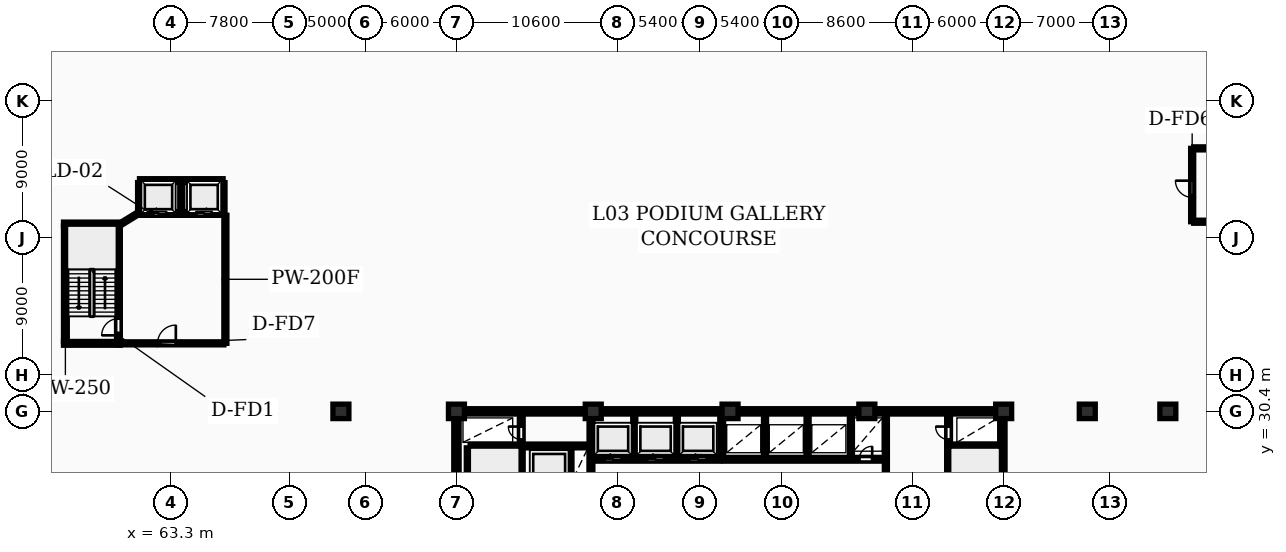
"""IFC4 building model, lengths in metres.
Left out: names, types, materials, properties, quantities, classifications, styles, units other than length and angle.
Written with IfcOpenShell. Run it as: python <this file> out.ifc"""

import sys

from ifc_helpers import new_model, si_unit, direction, frame, frame_2d, origin, origin_2d, place, context, subcontext, project, spatial, rectangle, extrude, element, fill, save


model = new_model("IFC4")
c1 = context("Model", 3, precision=1e-05, world=origin(), true_north=direction((0.0, 1.0)))
c2 = subcontext(c1, "Body", "Model", "MODEL_VIEW")
j1 = project(units=[si_unit("LENGTHUNIT", "METRE"), si_unit("PLANEANGLEUNIT", "RADIAN")], contexts=[c1])
p1 = place(None, origin())
s1 = spatial("IfcSite", under=j1, at=p1, CompositionType="ELEMENT")
p2 = place(p1, origin())
s2 = spatial("IfcBuilding", under=s1, at=p2, CompositionType="ELEMENT")
p3 = place(p2, frame((0.0, 0.0, 14.5)))
s3 = spatial("IfcBuildingStorey", under=s2, at=p3, CompositionType="ELEMENT", Elevation=14.5)
for number, where, z_axis, x_axis in (
    (1, (74.5, 30.4, 0.0), (0.0, 0.0, 1.0), (1.0, 0.0, 0.0)),
    (2, (82.1, 30.4, 0.0), (0.0, 0.0, 1.0), (1.0, 0.0, 0.0)),
    (3, (91.1, 30.4, 0.0), (0.0, 0.0, 1.0), (1.0, 0.0, 0.0)),
    (4, (100.1, 30.4, 0.0), (0.0, 0.0, 1.0), (1.0, 0.0, 0.0)),
    (5, (109.1, 30.4, 0.0), (0.0, 0.0, 1.0), (1.0, 0.0, 0.0)),
    (6, (118.1, 30.4, 0.0), (0.0, 0.0, 1.0), (1.0, 0.0, 0.0)),
    (7, (123.6, 30.4, 0.0), (0.0, 0.0, 1.0), (1.0, 0.0, 0.0)),
    (8, (128.9, 30.4, 0.0), (0.0, 0.0, 1.0), (1.0, 0.0, 0.0)),
):
    element("IfcColumn", number, at=place(p3, frame(where, z_axis=z_axis, x_axis=x_axis)), inside=s3, PredefinedType="COLUMN", context=c2, shape_type="SweptSolid", body=[
        extrude(rectangle(XDim=1.05, YDim=0.95, at=origin_2d()), origin(), (0.0, 0.0, 1.0), 4.5),
    ])
p4 = place(p3, frame((81.925, 30.4, 0.0), z_axis=(0.0, 0.0, 1.0), x_axis=(1.0, 0.0, 0.0)))
e9 = element("IfcWall", 9, at=p4, inside=s3, PredefinedType="SHEAR", context=c2, shape_type="SweptSolid", body=[
    extrude(rectangle(XDim=36.265, YDim=0.35, at=frame_2d((18.132, 0.0))), origin(), (0.0, 0.0, 1.0), 4.5),
])
for number, where, z_axis, x_axis in (
    (10, (82.1, 18.575, 0.0), (0.0, 0.0, 1.0), (0.0, 1.0, 0.0)),
    (11, (118.015, 18.575, 0.0), (0.0, 0.0, 1.0), (0.0, 1.0, 0.0)),
):
    element("IfcWall", number, at=place(p3, frame(where, z_axis=z_axis, x_axis=x_axis)), inside=s3, PredefinedType="SHEAR", context=c2, shape_type="SweptSolid", body=[
        extrude(rectangle(XDim=11.65, YDim=0.35, at=frame_2d((5.825, 0.0))), origin(), (0.0, 0.0, 1.0), 4.5),
    ])
p5 = place(p3, frame((82.875, 20.4, 0.0), z_axis=(0.0, 0.0, 1.0), x_axis=(0.0, 1.0, 0.0)))
e12 = element("IfcWall", 12, at=p5, inside=s3, PredefinedType="SHEAR", context=c2, shape_type="SweptSolid", body=[
    extrude(rectangle(XDim=7.6, YDim=0.25, at=frame_2d((3.8, 0.0))), origin(), (0.0, 0.0, 1.0), 4.5),
])
p6 = place(p3, frame((86.365, 18.6, 0.0), z_axis=(0.0, 0.0, 1.0), x_axis=(0.0, 1.0, 0.0)))
e13 = element("IfcWall", 13, at=p6, inside=s3, PredefinedType="SHEAR", context=c2, shape_type="SweptSolid", body=[
    extrude(rectangle(XDim=11.6, YDim=0.25, at=frame_2d((5.8, 0.0))), origin(), (0.0, 0.0, 1.0), 4.5),
])
p7 = place(p6, frame((0.45, 0.0, 0.0)))
e14 = element("IfcOpeningElement", 14, at=p7, cuts=e13, PredefinedType="OPENING", context=c2, shape_type="SweptSolid", body=[
    extrude(rectangle(XDim=0.85, YDim=2.05, at=frame_2d((0.425, 1.025))), frame((0.0, 0.135, 0.0), z_axis=(0.0, -1.0, 0.0), x_axis=(1.0, 0.0, 0.0)), (0.0, 0.0, 1.0), 0.27),
])
p8 = place(p6, frame((2.05, 0.0, 0.0)))
e15 = element("IfcOpeningElement", 15, at=p8, cuts=e13, PredefinedType="OPENING", context=c2, shape_type="SweptSolid", body=[
    extrude(rectangle(XDim=1.1, YDim=2.1, at=frame_2d((0.55, 1.05))), frame((0.0, 0.135, 0.0), z_axis=(0.0, -1.0, 0.0), x_axis=(1.0, 0.0, 0.0)), (0.0, 0.0, 1.0), 0.27),
])
p9 = place(p6, frame((9.95, 0.0, 0.0)))
e16 = element("IfcOpeningElement", 16, at=p9, cuts=e13, PredefinedType="OPENING", context=c2, shape_type="SweptSolid", body=[
    extrude(rectangle(XDim=0.85, YDim=2.05, at=frame_2d((0.425, 1.025))), frame((0.0, 0.135, 0.0), z_axis=(0.0, -1.0, 0.0), x_axis=(1.0, 0.0, 0.0)), (0.0, 0.0, 1.0), 0.27),
])
p10 = place(p3, frame((83.0, 28.125, 0.0), z_axis=(0.0, 0.0, 1.0), x_axis=(1.0, 0.0, 0.0)))
e17 = element("IfcWall", 17, at=p10, inside=s3, PredefinedType="SHEAR", context=c2, shape_type="SweptSolid", body=[
    extrude(rectangle(XDim=7.82, YDim=0.25, at=frame_2d((3.91, 0.0))), origin(), (0.0, 0.0, 1.0), 4.5),
])
p11 = place(p3, frame((89.6, 25.58, 0.0), z_axis=(0.0, 0.0, 1.0), x_axis=(0.0, 1.0, 0.0)))
e18 = element("IfcWall", 18, at=p11, inside=s3, PredefinedType="PARTITIONING", context=c2, shape_type="SweptSolid", body=[
    extrude(rectangle(XDim=2.42, YDim=0.2, at=frame_2d((1.21, 0.0))), origin(), (0.0, 0.0, 1.0), 4.18),
])
p12 = place(p3, frame((90.95, 18.6, 0.0), z_axis=(0.0, 0.0, 1.0), x_axis=(0.0, 1.0, 0.0)))
e19 = element("IfcWall", 19, at=p12, inside=s3, PredefinedType="SHEAR", context=c2, shape_type="SweptSolid", body=[
    extrude(rectangle(XDim=11.6, YDim=0.25, at=frame_2d((5.8, 0.0))), origin(), (0.0, 0.0, 1.0), 4.5),
])
p13 = place(p12, frame((4.6, 0.0, 0.0)))
e20 = element("IfcOpeningElement", 20, at=p13, cuts=e19, PredefinedType="OPENING", context=c2, shape_type="SweptSolid", body=[
    extrude(rectangle(XDim=1.1, YDim=2.1, at=frame_2d((0.55, 1.05))), frame((0.0, 0.135, 0.0), z_axis=(0.0, -1.0, 0.0), x_axis=(1.0, 0.0, 0.0)), (0.0, 0.0, 1.0), 0.27),
])
for number, where, z_axis, x_axis in (
    (21, (93.8, 27.38, 0.0), (0.0, 0.0, 1.0), (0.0, 1.0, 0.0)),
    (22, (96.6, 27.38, 0.0), (0.0, 0.0, 1.0), (0.0, 1.0, 0.0)),
):
    element("IfcWall", number, at=place(p3, frame(where, z_axis=z_axis, x_axis=x_axis)), inside=s3, PredefinedType="PARTITIONING", context=c2, shape_type="SweptSolid", body=[
        extrude(rectangle(XDim=2.82, YDim=0.2, at=frame_2d((1.41, 0.0))), origin(), (0.0, 0.0, 1.0), 4.18),
    ])
p14 = place(p3, frame((91.08, 27.25, 0.0), z_axis=(0.0, 0.0, 1.0), x_axis=(1.0, 0.0, 0.0)))
e23 = element("IfcWall", 23, at=p14, inside=s3, PredefinedType="SHEAR", context=c2, shape_type="SweptSolid", body=[
    extrude(rectangle(XDim=8.34, YDim=0.25, at=frame_2d((4.17, 0.0))), origin(), (0.0, 0.0, 1.0), 4.5),
])
p15 = place(p14, frame((0.76, 0.0, 0.0)))
e24 = element("IfcOpeningElement", 24, at=p15, cuts=e23, PredefinedType="OPENING", context=c2, shape_type="SweptSolid", body=[
    extrude(rectangle(XDim=1.12, YDim=2.12, at=frame_2d((0.56, 1.06))), frame((0.0, 0.135, 0.0), z_axis=(0.0, -1.0, 0.0), x_axis=(1.0, 0.0, 0.0)), (0.0, 0.0, 1.0), 0.27),
])
p16 = place(p14, frame((3.56, 0.0, 0.0)))
e25 = element("IfcOpeningElement", 25, at=p16, cuts=e23, PredefinedType="OPENING", context=c2, shape_type="SweptSolid", body=[
    extrude(rectangle(XDim=1.12, YDim=2.12, at=frame_2d((0.56, 1.06))), frame((0.0, 0.135, 0.0), z_axis=(0.0, -1.0, 0.0), x_axis=(1.0, 0.0, 0.0)), (0.0, 0.0, 1.0), 0.27),
])
p17 = place(p14, frame((6.36, 0.0, 0.0)))
e26 = element("IfcOpeningElement", 26, at=p17, cuts=e23, PredefinedType="OPENING", context=c2, shape_type="SweptSolid", body=[
    extrude(rectangle(XDim=1.12, YDim=2.12, at=frame_2d((0.56, 1.06))), frame((0.0, 0.135, 0.0), z_axis=(0.0, -1.0, 0.0), x_axis=(1.0, 0.0, 0.0)), (0.0, 0.0, 1.0), 0.27),
])
p18 = place(p3, frame((99.55, 27.25, 0.0), z_axis=(0.0, 0.0, 1.0), x_axis=(0.0, 1.0, 0.0)))
e27 = element("IfcWall", 27, at=p18, inside=s3, PredefinedType="SHEAR", context=c2, shape_type="SweptSolid", body=[
    extrude(rectangle(XDim=2.95, YDim=0.25, at=frame_2d((1.475, 0.0))), origin(), (0.0, 0.0, 1.0), 4.5),
])
for number, where, z_axis, x_axis in (
    (28, (102.4, 27.38, 0.0), (0.0, 0.0, 1.0), (0.0, 1.0, 0.0)),
    (29, (105.2, 27.38, 0.0), (0.0, 0.0, 1.0), (0.0, 1.0, 0.0)),
    (30, (108.05, 27.38, 0.0), (0.0, 0.0, 1.0), (0.0, 1.0, 0.0)),
):
    element("IfcWall", number, at=place(p3, frame(where, z_axis=z_axis, x_axis=x_axis)), inside=s3, PredefinedType="PARTITIONING", context=c2, shape_type="SweptSolid", body=[
        extrude(rectangle(XDim=2.82, YDim=0.2, at=frame_2d((1.41, 0.0))), origin(), (0.0, 0.0, 1.0), 4.18),
    ])
p19 = place(p3, frame((99.68, 27.25, 0.0), z_axis=(0.0, 0.0, 1.0), x_axis=(1.0, 0.0, 0.0)))
e31 = element("IfcWall", 31, at=p19, inside=s3, PredefinedType="SHEAR", context=c2, shape_type="SweptSolid", body=[
    extrude(rectangle(XDim=10.54, YDim=0.25, at=frame_2d((5.27, 0.0))), origin(), (0.0, 0.0, 1.0), 4.5),
])
p20 = place(p19, frame((8.92, 0.0, 0.0)))
e32 = element("IfcOpeningElement", 32, at=p20, cuts=e31, PredefinedType="OPENING", context=c2, shape_type="SweptSolid", body=[
    extrude(rectangle(XDim=0.85, YDim=2.05, at=frame_2d((0.425, 1.025))), frame((0.0, 0.135, 0.0), z_axis=(0.0, -1.0, 0.0), x_axis=(1.0, 0.0, 0.0)), (0.0, 0.0, 1.0), 0.27),
])
p21 = place(p3, frame((110.35, 18.6, 0.0), z_axis=(0.0, 0.0, 1.0), x_axis=(0.0, 1.0, 0.0)))
e33 = element("IfcWall", 33, at=p21, inside=s3, PredefinedType="PARTITIONING", context=c2, shape_type="SweptSolid", body=[
    extrude(rectangle(XDim=11.6, YDim=0.2, at=frame_2d((5.8, 0.0))), origin(), (0.0, 0.0, 1.0), 4.18),
])
p22 = place(p21, frame((5.2, 0.0, 0.0)))
e34 = element("IfcOpeningElement", 34, at=p22, cuts=e33, PredefinedType="OPENING", context=c2, shape_type="SweptSolid", body=[
    extrude(rectangle(XDim=1.1, YDim=2.15, at=frame_2d((0.55, 1.075))), frame((0.0, 0.11, 0.0), z_axis=(0.0, -1.0, 0.0), x_axis=(1.0, 0.0, 0.0)), (0.0, 0.0, 1.0), 0.22),
])
p23 = place(p3, frame((114.475, 18.6, 0.0), z_axis=(0.0, 0.0, 1.0), x_axis=(0.0, 1.0, 0.0)))
e35 = element("IfcWall", 35, at=p23, inside=s3, PredefinedType="SHEAR", context=c2, shape_type="SweptSolid", body=[
    extrude(rectangle(XDim=11.6, YDim=0.25, at=frame_2d((5.8, 0.0))), origin(), (0.0, 0.0, 1.0), 4.5),
])
p24 = place(p23, frame((0.45, 0.0, 0.0)))
e36 = element("IfcOpeningElement", 36, at=p24, cuts=e35, PredefinedType="OPENING", context=c2, shape_type="SweptSolid", body=[
    extrude(rectangle(XDim=0.85, YDim=2.05, at=frame_2d((0.425, 1.025))), frame((0.0, 0.135, 0.0), z_axis=(0.0, -1.0, 0.0), x_axis=(1.0, 0.0, 0.0)), (0.0, 0.0, 1.0), 0.27),
])
p25 = place(p23, frame((2.05, 0.0, 0.0)))
e37 = element("IfcOpeningElement", 37, at=p25, cuts=e35, PredefinedType="OPENING", context=c2, shape_type="SweptSolid", body=[
    extrude(rectangle(XDim=1.1, YDim=2.1, at=frame_2d((0.55, 1.05))), frame((0.0, 0.135, 0.0), z_axis=(0.0, -1.0, 0.0), x_axis=(1.0, 0.0, 0.0)), (0.0, 0.0, 1.0), 0.27),
])
p26 = place(p23, frame((9.95, 0.0, 0.0)))
e38 = element("IfcOpeningElement", 38, at=p26, cuts=e35, PredefinedType="OPENING", context=c2, shape_type="SweptSolid", body=[
    extrude(rectangle(XDim=0.85, YDim=2.05, at=frame_2d((0.425, 1.025))), frame((0.0, 0.135, 0.0), z_axis=(0.0, -1.0, 0.0), x_axis=(1.0, 0.0, 0.0)), (0.0, 0.0, 1.0), 0.27),
])
p27 = place(p3, frame((114.6, 28.125, 0.0), z_axis=(0.0, 0.0, 1.0), x_axis=(1.0, 0.0, 0.0)))
e39 = element("IfcWall", 39, at=p27, inside=s3, PredefinedType="SHEAR", context=c2, shape_type="SweptSolid", body=[
    extrude(rectangle(XDim=3.24, YDim=0.25, at=frame_2d((1.62, 0.0))), origin(), (0.0, 0.0, 1.0), 4.5),
])
p28 = place(p3, frame((56.375, 35.0, 0.0), z_axis=(0.0, 0.0, 1.0), x_axis=(0.0, 1.0, 0.0)))
e40 = element("IfcWall", 40, at=p28, inside=s3, PredefinedType="SHEAR", context=c2, shape_type="SweptSolid", body=[
    extrude(rectangle(XDim=7.6, YDim=0.25, at=frame_2d((3.8, 0.0))), origin(), (0.0, 0.0, 1.0), 4.5),
])
for number, where, z_axis, x_axis in (
    (41, (56.25, 42.725, 0.0), (0.0, 0.0, 1.0), (1.0, 0.0, 0.0)),
    (42, (56.25, 34.875, 0.0), (0.0, 0.0, 1.0), (1.0, 0.0, 0.0)),
):
    element("IfcWall", number, at=place(p3, frame(where, z_axis=z_axis, x_axis=x_axis)), inside=s3, PredefinedType="SHEAR", context=c2, shape_type="SweptSolid", body=[
        extrude(rectangle(XDim=3.74, YDim=0.25, at=frame_2d((1.87, 0.0))), origin(), (0.0, 0.0, 1.0), 4.5),
    ])
p29 = place(p3, frame((59.865, 35.0, 0.0), z_axis=(0.0, 0.0, 1.0), x_axis=(0.0, 1.0, 0.0)))
e43 = element("IfcWall", 43, at=p29, inside=s3, PredefinedType="SHEAR", context=c2, shape_type="SweptSolid", body=[
    extrude(rectangle(XDim=7.6, YDim=0.25, at=frame_2d((3.8, 0.0))), origin(), (0.0, 0.0, 1.0), 4.5),
])
p30 = place(p29, frame((0.4, 0.0, 0.0)))
e44 = element("IfcOpeningElement", 44, at=p30, cuts=e43, PredefinedType="OPENING", context=c2, shape_type="SweptSolid", body=[
    extrude(rectangle(XDim=1.1, YDim=2.1, at=frame_2d((0.55, 1.05))), frame((0.0, 0.135, 0.0), z_axis=(0.0, -1.0, 0.0), x_axis=(1.0, 0.0, 0.0)), (0.0, 0.0, 1.0), 0.27),
])
p31 = place(p3, frame((61.25, 43.42, 0.0), z_axis=(0.0, 0.0, 1.0), x_axis=(1.0, 0.0, 0.0)))
e45 = element("IfcWall", 45, at=p31, inside=s3, PredefinedType="SHEAR", context=c2, shape_type="SweptSolid", body=[
    extrude(rectangle(XDim=5.5, YDim=0.25, at=frame_2d((2.75, 0.0))), origin(), (0.0, 0.0, 1.0), 4.5),
])
p32 = place(p31, frame((0.74, 0.0, 0.0)))
e46 = element("IfcOpeningElement", 46, at=p32, cuts=e45, PredefinedType="OPENING", context=c2, shape_type="SweptSolid", body=[
    extrude(rectangle(XDim=1.02, YDim=2.12, at=frame_2d((0.51, 1.06))), frame((0.0, 0.135, 0.0), z_axis=(0.0, -1.0, 0.0), x_axis=(1.0, 0.0, 0.0)), (0.0, 0.0, 1.0), 0.27),
])
p33 = place(p31, frame((3.74, 0.0, 0.0)))
e47 = element("IfcOpeningElement", 47, at=p33, cuts=e45, PredefinedType="OPENING", context=c2, shape_type="SweptSolid", body=[
    extrude(rectangle(XDim=1.02, YDim=2.12, at=frame_2d((0.51, 1.06))), frame((0.0, 0.135, 0.0), z_axis=(0.0, -1.0, 0.0), x_axis=(1.0, 0.0, 0.0)), (0.0, 0.0, 1.0), 0.27),
])
p34 = place(p3, frame((61.25, 45.58, 0.0), z_axis=(0.0, 0.0, 1.0), x_axis=(1.0, 0.0, 0.0)))
e48 = element("IfcWall", 48, at=p34, inside=s3, PredefinedType="SHEAR", context=c2, shape_type="SweptSolid", body=[
    extrude(rectangle(XDim=5.5, YDim=0.25, at=frame_2d((2.75, 0.0))), origin(), (0.0, 0.0, 1.0), 4.5),
])
for number, where, z_axis, x_axis in (
    (49, (61.25, 43.55, 0.0), (0.0, 0.0, 1.0), (0.0, 1.0, 0.0)),
    (50, (66.75, 43.55, 0.0), (0.0, 0.0, 1.0), (0.0, 1.0, 0.0)),
):
    element("IfcWall", number, at=place(p3, frame(where, z_axis=z_axis, x_axis=x_axis)), inside=s3, PredefinedType="SHEAR", context=c2, shape_type="SweptSolid", body=[
        extrude(rectangle(XDim=1.9, YDim=0.25, at=frame_2d((0.95, 0.0))), origin(), (0.0, 0.0, 1.0), 4.5),
    ])
p35 = place(p3, frame((64.0, 43.55, 0.0), z_axis=(0.0, 0.0, 1.0), x_axis=(0.0, 1.0, 0.0)))
e51 = element("IfcWall", 51, at=p35, inside=s3, PredefinedType="PARTITIONING", context=c2, shape_type="SweptSolid", body=[
    extrude(rectangle(XDim=1.9, YDim=0.2, at=frame_2d((0.95, 0.0))), origin(), (0.0, 0.0, 1.0), 4.18),
])
p36 = place(p3, frame((59.84, 34.875, 0.0), z_axis=(0.0, 0.0, 1.0), x_axis=(1.0, 0.0, 0.0)))
e52 = element("IfcWall", 52, at=p36, inside=s3, PredefinedType="PARTITIONING", context=c2, shape_type="SweptSolid", body=[
    extrude(rectangle(XDim=6.96, YDim=0.2, at=frame_2d((3.48, 0.0))), origin(), (0.0, 0.0, 1.0), 4.18),
])
p37 = place(p36, frame((2.6, 0.0, 0.0)))
e53 = element("IfcOpeningElement", 53, at=p37, cuts=e52, PredefinedType="OPENING", context=c2, shape_type="SweptSolid", body=[
    extrude(rectangle(XDim=1.2, YDim=2.18, at=frame_2d((0.6, 1.09))), frame((0.0, 0.11, 0.0), z_axis=(0.0, -1.0, 0.0), x_axis=(1.0, 0.0, 0.0)), (0.0, 0.0, 1.0), 0.22),
])
p38 = place(p3, frame((66.9, 34.875, 0.0), z_axis=(0.0, 0.0, 1.0), x_axis=(0.0, 1.0, 0.0)))
e54 = element("IfcWall", 54, at=p38, inside=s3, PredefinedType="PARTITIONING", context=c2, shape_type="SweptSolid", body=[
    extrude(rectangle(XDim=8.425, YDim=0.2, at=frame_2d((4.212, 0.0))), origin(), (0.0, 0.0, 1.0), 4.18),
])
p39 = place(p3, frame((60.02, 42.725, 0.0), z_axis=(0.0, 0.0, 1.0), x_axis=(0.851822584555, 0.523830396638, 0.0)))
e55 = element("IfcWall", 55, at=p39, inside=s3, PredefinedType="PARTITIONING", context=c2, shape_type="SweptSolid", body=[
    extrude(rectangle(XDim=1.326, YDim=0.2, at=frame_2d((0.663, 0.0))), origin(), (0.0, 0.0, 1.0), 4.18),
])
p40 = place(p3, frame((130.5, 42.875, 0.0), z_axis=(0.0, 0.0, 1.0), x_axis=(0.0, 1.0, 0.0)))
e56 = element("IfcWall", 56, at=p40, inside=s3, PredefinedType="PARTITIONING", context=c2, shape_type="SweptSolid", body=[
    extrude(rectangle(XDim=4.825, YDim=0.2, at=frame_2d((2.413, 0.0))), origin(), (0.0, 0.0, 1.0), 4.18),
])
p41 = place(p40, frame((1.6, 0.0, 0.0)))
e57 = element("IfcOpeningElement", 57, at=p41, cuts=e56, PredefinedType="OPENING", context=c2, shape_type="SweptSolid", body=[
    extrude(rectangle(XDim=1.1, YDim=2.15, at=frame_2d((0.55, 1.075))), frame((0.0, 0.11, 0.0), z_axis=(0.0, -1.0, 0.0), x_axis=(1.0, 0.0, 0.0)), (0.0, 0.0, 1.0), 0.22),
])
for number, where, z_axis, x_axis in (
    (58, (130.6, 42.875, 0.0), (0.0, 0.0, 1.0), (1.0, 0.0, 0.0)),
    (59, (130.6, 47.7, 0.0), (0.0, 0.0, 1.0), (1.0, 0.0, 0.0)),
):
    element("IfcWall", number, at=place(p3, frame(where, z_axis=z_axis, x_axis=x_axis)), inside=s3, PredefinedType="PARTITIONING", context=c2, shape_type="SweptSolid", body=[
        extrude(rectangle(XDim=3.65, YDim=0.2, at=frame_2d((1.825, 0.0))), origin(), (0.0, 0.0, 1.0), 4.18),
    ])
p42 = place(p9, origin())
e60 = element("IfcDoor", 60, at=p42, inside=s3, OperationType="SINGLE_SWING_RIGHT", PredefinedType="DOOR", context=c2, shape_type="SweptSolid", body=[
    extrude(rectangle(XDim=0.85, YDim=2.05, at=frame_2d((0.425, 1.025))), frame((0.0, 0.025, 0.0), z_axis=(0.0, -1.0, 0.0), x_axis=(1.0, 0.0, 0.0)), (0.0, 0.0, 1.0), 0.05),
])
fill(e16, e60)
p43 = place(p15, origin())
e61 = element("IfcDoor", 61, at=p43, inside=s3, OperationType="SLIDING_TO_LEFT", PredefinedType="DOOR", context=c2, shape_type="SweptSolid", body=[
    extrude(rectangle(XDim=1.12, YDim=2.12, at=frame_2d((0.56, 1.06))), frame((0.0, 0.025, 0.0), z_axis=(0.0, -1.0, 0.0), x_axis=(1.0, 0.0, 0.0)), (0.0, 0.0, 1.0), 0.05),
])
fill(e24, e61)
p44 = place(p16, origin())
e62 = element("IfcDoor", 62, at=p44, inside=s3, OperationType="SLIDING_TO_LEFT", PredefinedType="DOOR", context=c2, shape_type="SweptSolid", body=[
    extrude(rectangle(XDim=1.12, YDim=2.12, at=frame_2d((0.56, 1.06))), frame((0.0, 0.025, 0.0), z_axis=(0.0, -1.0, 0.0), x_axis=(1.0, 0.0, 0.0)), (0.0, 0.0, 1.0), 0.05),
])
fill(e25, e62)
p45 = place(p17, origin())
e63 = element("IfcDoor", 63, at=p45, inside=s3, OperationType="SLIDING_TO_LEFT", PredefinedType="DOOR", context=c2, shape_type="SweptSolid", body=[
    extrude(rectangle(XDim=1.12, YDim=2.12, at=frame_2d((0.56, 1.06))), frame((0.0, 0.025, 0.0), z_axis=(0.0, -1.0, 0.0), x_axis=(1.0, 0.0, 0.0)), (0.0, 0.0, 1.0), 0.05),
])
fill(e26, e63)
p46 = place(p20, origin())
e64 = element("IfcDoor", 64, at=p46, inside=s3, OperationType="SINGLE_SWING_RIGHT", PredefinedType="DOOR", context=c2, shape_type="SweptSolid", body=[
    extrude(rectangle(XDim=0.85, YDim=2.05, at=frame_2d((0.425, 1.025))), frame((0.0, 0.025, 0.0), z_axis=(0.0, -1.0, 0.0), x_axis=(1.0, 0.0, 0.0)), (0.0, 0.0, 1.0), 0.05),
])
fill(e32, e64)
p47 = place(p26, origin())
e65 = element("IfcDoor", 65, at=p47, inside=s3, OperationType="SINGLE_SWING_RIGHT", PredefinedType="DOOR", context=c2, shape_type="SweptSolid", body=[
    extrude(rectangle(XDim=0.85, YDim=2.05, at=frame_2d((0.425, 1.025))), frame((0.0, 0.025, 0.0), z_axis=(0.0, -1.0, 0.0), x_axis=(1.0, 0.0, 0.0)), (0.0, 0.0, 1.0), 0.05),
])
fill(e38, e65)
p48 = place(p30, origin())
e66 = element("IfcDoor", 66, at=p48, inside=s3, OperationType="SINGLE_SWING_LEFT", PredefinedType="DOOR", context=c2, shape_type="SweptSolid", body=[
    extrude(rectangle(XDim=1.1, YDim=2.1, at=frame_2d((0.55, 1.05))), frame((0.0, 0.025, 0.0), z_axis=(0.0, -1.0, 0.0), x_axis=(1.0, 0.0, 0.0)), (0.0, 0.0, 1.0), 0.05),
])
fill(e44, e66)
p49 = place(p32, origin())
e67 = element("IfcDoor", 67, at=p49, inside=s3, OperationType="SLIDING_TO_LEFT", PredefinedType="DOOR", context=c2, shape_type="SweptSolid", body=[
    extrude(rectangle(XDim=1.02, YDim=2.12, at=frame_2d((0.51, 1.06))), frame((0.0, 0.025, 0.0), z_axis=(0.0, -1.0, 0.0), x_axis=(1.0, 0.0, 0.0)), (0.0, 0.0, 1.0), 0.05),
])
fill(e46, e67)
p50 = place(p33, origin())
e68 = element("IfcDoor", 68, at=p50, inside=s3, OperationType="SLIDING_TO_RIGHT", PredefinedType="DOOR", context=c2, shape_type="SweptSolid", body=[
    extrude(rectangle(XDim=1.02, YDim=2.12, at=frame_2d((0.51, 1.06))), frame((0.0, 0.025, 0.0), z_axis=(0.0, -1.0, 0.0), x_axis=(1.0, 0.0, 0.0)), (0.0, 0.0, 1.0), 0.05),
])
fill(e47, e68)
p51 = place(p37, origin())
e69 = element("IfcDoor", 69, at=p51, inside=s3, OperationType="SINGLE_SWING_RIGHT", PredefinedType="DOOR", context=c2, shape_type="SweptSolid", body=[
    extrude(rectangle(XDim=1.2, YDim=2.18, at=frame_2d((0.6, 1.09))), frame((0.0, 0.025, 0.0), z_axis=(0.0, -1.0, 0.0), x_axis=(1.0, 0.0, 0.0)), (0.0, 0.0, 1.0), 0.05),
])
fill(e53, e69)
p52 = place(p41, origin())
e70 = element("IfcDoor", 70, at=p52, inside=s3, OperationType="SINGLE_SWING_RIGHT", PredefinedType="DOOR", context=c2, shape_type="SweptSolid", body=[
    extrude(rectangle(XDim=1.1, YDim=2.15, at=frame_2d((0.55, 1.075))), frame((0.0, 0.025, 0.0), z_axis=(0.0, -1.0, 0.0), x_axis=(1.0, 0.0, 0.0)), (0.0, 0.0, 1.0), 0.05),
])
fill(e57, e70)
save(model, sys.argv[1])
